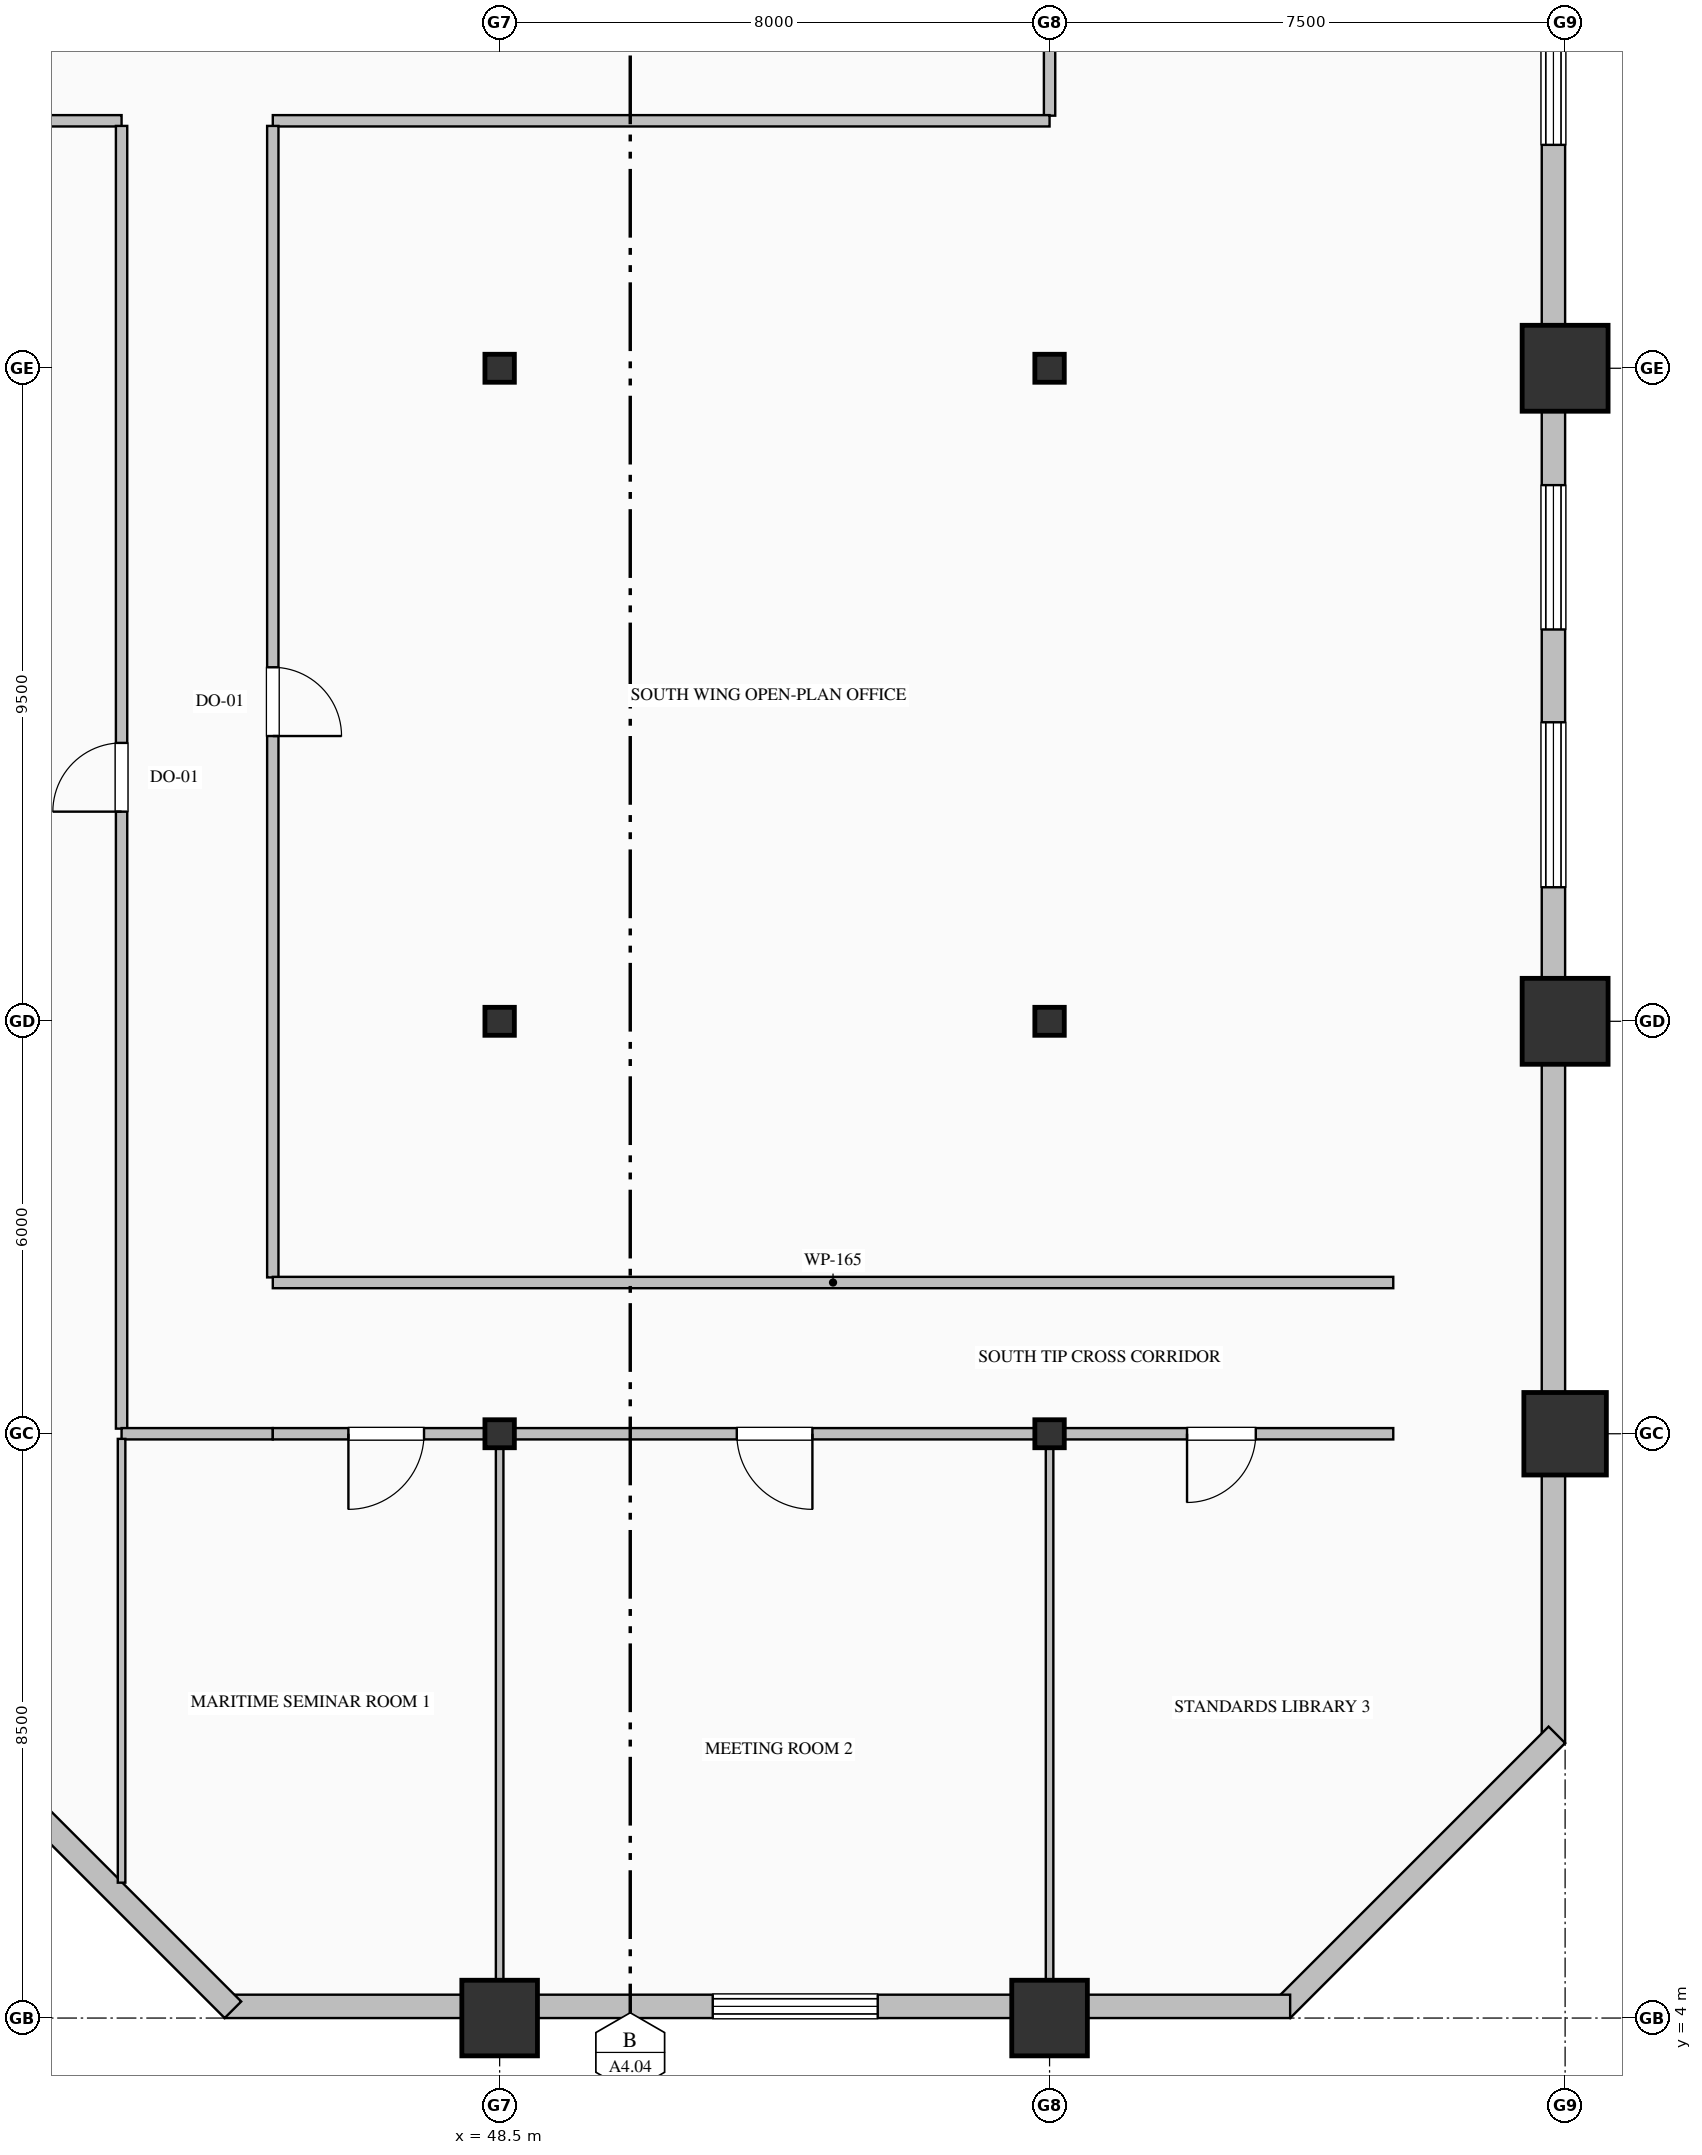
"""IFC4 building model, lengths in metres.
Left out: names, types, materials, properties, quantities, classifications, styles, units other than length and angle.
Written with IfcOpenShell. Run it as: python <this file> out.ifc"""

import sys

from ifc_helpers import new_model, si_unit, direction, frame, frame_2d, origin, origin_2d, place, context, subcontext, project, spatial, rectangle, hollow_rectangle, hollow_circle, i_section, extrude, element, fill, save


model = new_model("IFC4")
c1 = context("Model", 3, precision=1e-05, world=origin(), true_north=direction((0.0, 1.0)))
c2 = subcontext(c1, "Body", "Model", "MODEL_VIEW")
j1 = project(units=[si_unit("LENGTHUNIT", "METRE"), si_unit("PLANEANGLEUNIT", "RADIAN")], contexts=[c1])
p1 = place(None, origin())
s1 = spatial("IfcSite", under=j1, at=p1, CompositionType="ELEMENT")
p2 = place(p1, origin())
s2 = spatial("IfcBuilding", under=s1, at=p2, CompositionType="ELEMENT")
p3 = place(p2, frame((0.0, 0.0, 48.2)))
s3 = spatial("IfcBuildingStorey", under=s2, at=p3, CompositionType="ELEMENT", Elevation=48.2)
p4 = place(p3, frame((48.5, 4.0, 0.0), z_axis=(0.0, 0.0, 1.0), x_axis=(1.0, 0.0, 0.0)))
e1 = element("IfcColumn", 1, at=p4, inside=s3, PredefinedType="COLUMN", context=c2, shape_type="SweptSolid", body=[
    extrude(hollow_rectangle(XDim=1.1, YDim=1.1, WallThickness=0.04, at=origin_2d()), origin(), (0.0, 0.0, 1.0), 4.0),
])
for number, where, z_axis, x_axis in (
    (2, (48.5, 12.5, 0.0), (0.0, 0.0, 1.0), (1.0, 0.0, 0.0)),
    (3, (48.5, 18.5, 0.0), (0.0, 0.0, 1.0), (1.0, 0.0, 0.0)),
    (4, (48.5, 28.0, 0.0), (0.0, 0.0, 1.0), (1.0, 0.0, 0.0)),
):
    element("IfcColumn", number, at=place(p3, frame(where, z_axis=z_axis, x_axis=x_axis)), inside=s3, PredefinedType="COLUMN", context=c2, shape_type="SweptSolid", body=[
        extrude(i_section(OverallWidth=0.407, OverallDepth=0.428, WebThickness=0.02, FlangeThickness=0.035, FilletRadius=0.022, at=origin_2d()), origin(), (0.0, 0.0, 1.0), 4.0),
    ])
p5 = place(p3, frame((56.5, 4.0, 0.0), z_axis=(0.0, 0.0, 1.0), x_axis=(1.0, 0.0, 0.0)))
e5 = element("IfcColumn", 5, at=p5, inside=s3, PredefinedType="COLUMN", context=c2, shape_type="SweptSolid", body=[
    extrude(hollow_rectangle(XDim=1.1, YDim=1.1, WallThickness=0.04, at=origin_2d()), origin(), (0.0, 0.0, 1.0), 4.0),
])
for number, where, z_axis, x_axis in (
    (6, (56.5, 12.5, 0.0), (0.0, 0.0, 1.0), (1.0, 0.0, 0.0)),
    (7, (56.5, 18.5, 0.0), (0.0, 0.0, 1.0), (1.0, 0.0, 0.0)),
    (8, (56.5, 28.0, 0.0), (0.0, 0.0, 1.0), (1.0, 0.0, 0.0)),
):
    element("IfcColumn", number, at=place(p3, frame(where, z_axis=z_axis, x_axis=x_axis)), inside=s3, PredefinedType="COLUMN", context=c2, shape_type="SweptSolid", body=[
        extrude(i_section(OverallWidth=0.407, OverallDepth=0.428, WebThickness=0.02, FlangeThickness=0.035, FilletRadius=0.022, at=origin_2d()), origin(), (0.0, 0.0, 1.0), 4.0),
    ])
p6 = place(p3, frame((64.0, 12.5, 0.0), z_axis=(0.0, 0.0, 1.0), x_axis=(1.0, 0.0, 0.0)))
e9 = element("IfcColumn", 9, at=p6, inside=s3, PredefinedType="COLUMN", context=c2, shape_type="SweptSolid", body=[
    extrude(hollow_circle(Radius=0.6, WallThickness=0.04, at=origin_2d()), origin(), (0.0, 0.0, 1.0), 4.0),
])
for number, where, z_axis, x_axis in (
    (10, (64.0, 18.5, 0.0), (0.0, 0.0, 1.0), (1.0, 0.0, 0.0)),
    (11, (64.0, 28.0, 0.0), (0.0, 0.0, 1.0), (1.0, 0.0, 0.0)),
):
    element("IfcColumn", number, at=place(p3, frame(where, z_axis=z_axis, x_axis=x_axis)), inside=s3, PredefinedType="COLUMN", context=c2, shape_type="SweptSolid", body=[
        extrude(hollow_rectangle(XDim=1.25, YDim=1.25, WallThickness=0.045, at=origin_2d()), origin(), (0.0, 0.0, 1.0), 4.0),
    ])
p7 = place(p3, frame((63.83, 36.05, 0.0), z_axis=(0.0, 0.0, 1.0), x_axis=(0.0, -1.0, 0.0)))
e12 = element("IfcWall", 12, at=p7, inside=s3, PredefinedType="SOLIDWALL", context=c2, shape_type="SweptSolid", body=[
    extrude(rectangle(XDim=28.05, YDim=0.34, at=frame_2d((14.025, 0.0))), origin(), (0.0, 0.0, 1.0), 3.25),
])
p8 = place(p7, frame((2.4, 0.0, 0.8)))
e13 = element("IfcOpeningElement", 13, at=p8, cuts=e12, PredefinedType="OPENING", context=c2, shape_type="SweptSolid", body=[
    extrude(rectangle(XDim=2.4, YDim=2.15, at=frame_2d((1.2, 1.075))), frame((0.0, 0.18, 0.0), z_axis=(0.0, -1.0, 0.0), x_axis=(1.0, 0.0, 0.0)), (0.0, 0.0, 1.0), 0.36),
])
p9 = place(p7, frame((9.75, 0.0, 0.85)))
e14 = element("IfcOpeningElement", 14, at=p9, cuts=e12, PredefinedType="OPENING", context=c2, shape_type="SweptSolid", body=[
    extrude(rectangle(XDim=2.1, YDim=2.05, at=frame_2d((1.05, 1.025))), frame((0.0, 0.18, 0.0), z_axis=(0.0, -1.0, 0.0), x_axis=(1.0, 0.0, 0.0)), (0.0, 0.0, 1.0), 0.36),
])
p10 = place(p7, frame((13.2, 0.0, 0.8)))
e15 = element("IfcOpeningElement", 15, at=p10, cuts=e12, PredefinedType="OPENING", context=c2, shape_type="SweptSolid", body=[
    extrude(rectangle(XDim=2.4, YDim=2.15, at=frame_2d((1.2, 1.075))), frame((0.0, 0.18, 0.0), z_axis=(0.0, -1.0, 0.0), x_axis=(1.0, 0.0, 0.0)), (0.0, 0.0, 1.0), 0.36),
])
p11 = place(p3, frame((63.88, 8.12, 0.0), z_axis=(0.0, 0.0, 1.0), x_axis=(-0.707106781187, -0.707106781187, 0.0)))
e16 = element("IfcWall", 16, at=p11, inside=s3, PredefinedType="SOLIDWALL", context=c2, shape_type="SweptSolid", body=[
    extrude(rectangle(XDim=5.657, YDim=0.34, at=frame_2d((2.828, 0.0))), origin(), (0.0, 0.0, 1.0), 3.75),
])
p12 = place(p3, frame((60.0, 4.17, 0.0), z_axis=(0.0, 0.0, 1.0), x_axis=(-1.0, 0.0, 0.0)))
e17 = element("IfcWall", 17, at=p12, inside=s3, PredefinedType="SOLIDWALL", context=c2, shape_type="SweptSolid", body=[
    extrude(rectangle(XDim=15.5, YDim=0.34, at=frame_2d((7.75, 0.0))), origin(), (0.0, 0.0, 1.0), 3.25),
])
p13 = place(p12, frame((6.0, 0.0, 0.8)))
e18 = element("IfcOpeningElement", 18, at=p13, cuts=e17, PredefinedType="OPENING", context=c2, shape_type="SweptSolid", body=[
    extrude(rectangle(XDim=2.4, YDim=2.15, at=frame_2d((1.2, 1.075))), frame((0.0, 0.18, 0.0), z_axis=(0.0, -1.0, 0.0), x_axis=(1.0, 0.0, 0.0)), (0.0, 0.0, 1.0), 0.36),
])
p14 = place(p3, frame((44.62, 4.12, 0.0), z_axis=(0.0, 0.0, 1.0), x_axis=(-0.707106781187, 0.707106781187, 0.0)))
e19 = element("IfcWall", 19, at=p14, inside=s3, PredefinedType="SOLIDWALL", context=c2, shape_type="SweptSolid", body=[
    extrude(rectangle(XDim=5.657, YDim=0.34, at=frame_2d((2.828, 0.0))), origin(), (0.0, 0.0, 1.0), 3.75),
])
p15 = place(p3, frame((56.5, 33.726, 0.0), z_axis=(0.0, 0.0, 1.0), x_axis=(0.0, -1.0, 0.0)))
e20 = element("IfcWall", 20, at=p15, inside=s3, PredefinedType="PARTITIONING", context=c2, shape_type="SweptSolid", body=[
    extrude(rectangle(XDim=2.051, YDim=0.165, at=frame_2d((1.025, 0.0))), origin(), (0.0, 0.0, 1.0), 3.042),
])
p16 = place(p3, frame((56.5, 31.6, 0.0), z_axis=(0.0, 0.0, 1.0), x_axis=(-1.0, 0.0, 0.0)))
e21 = element("IfcWall", 21, at=p16, inside=s3, PredefinedType="PARTITIONING", context=c2, shape_type="SweptSolid", body=[
    extrude(rectangle(XDim=11.3, YDim=0.165, at=frame_2d((5.65, 0.0))), origin(), (0.0, 0.0, 1.0), 3.75),
])
p17 = place(p3, frame((43.0, 31.6, 0.0), z_axis=(0.0, 0.0, 1.0), x_axis=(-1.0, 0.0, 0.0)))
e22 = element("IfcWall", 22, at=p17, inside=s3, PredefinedType="PARTITIONING", context=c2, shape_type="SweptSolid", body=[
    extrude(rectangle(XDim=2.5, YDim=0.165, at=frame_2d((1.25, 0.0))), origin(), (0.0, 0.0, 1.0), 3.75),
])
p18 = place(p3, frame((45.2, 31.525, 0.0), z_axis=(0.0, 0.0, 1.0), x_axis=(0.0, -1.0, 0.0)))
e23 = element("IfcWall", 23, at=p18, inside=s3, PredefinedType="PARTITIONING", context=c2, shape_type="SweptSolid", body=[
    extrude(rectangle(XDim=16.751, YDim=0.165, at=frame_2d((8.375, 0.0))), origin(), (0.0, 0.0, 1.0), 3.75),
])
p19 = place(p18, frame((7.875, 0.0, 0.0)))
e24 = element("IfcOpeningElement", 24, at=p19, cuts=e23, PredefinedType="OPENING", context=c2, shape_type="SweptSolid", body=[
    extrude(rectangle(XDim=1.0, YDim=2.15, at=frame_2d((0.5, 1.075))), frame((0.0, 0.093, 0.0), z_axis=(0.0, -1.0, 0.0), x_axis=(1.0, 0.0, 0.0)), (0.0, 0.0, 1.0), 0.185),
])
p20 = place(p3, frame((43.0, 12.574, 0.0), z_axis=(0.0, 0.0, 1.0), x_axis=(0.0, 1.0, 0.0)))
e25 = element("IfcWall", 25, at=p20, inside=s3, PredefinedType="PARTITIONING", context=c2, shape_type="SweptSolid", body=[
    extrude(rectangle(XDim=18.951, YDim=0.165, at=frame_2d((9.476, 0.0))), origin(), (0.0, 0.0, 1.0), 3.75),
])
p21 = place(p20, frame((8.976, 0.0, 0.0)))
e26 = element("IfcOpeningElement", 26, at=p21, cuts=e25, PredefinedType="OPENING", context=c2, shape_type="SweptSolid", body=[
    extrude(rectangle(XDim=1.0, YDim=2.15, at=frame_2d((0.5, 1.075))), frame((0.0, 0.093, 0.0), z_axis=(0.0, -1.0, 0.0), x_axis=(1.0, 0.0, 0.0)), (0.0, 0.0, 1.0), 0.185),
])
p22 = place(p3, frame((45.2, 12.5, 0.0), z_axis=(0.0, 0.0, 1.0), x_axis=(-1.0, 0.0, 0.0)))
e27 = element("IfcWall", 27, at=p22, inside=s3, PredefinedType="PARTITIONING", context=c2, shape_type="SweptSolid", body=[
    extrude(rectangle(XDim=2.2, YDim=0.165, at=frame_2d((1.1, 0.0))), origin(), (0.0, 0.0, 1.0), 3.042),
])
p23 = place(p3, frame((45.2, 14.7, 0.0), z_axis=(0.0, 0.0, 1.0), x_axis=(1.0, 0.0, 0.0)))
e28 = element("IfcWall", 28, at=p23, inside=s3, PredefinedType="PARTITIONING", context=c2, shape_type="SweptSolid", body=[
    extrude(rectangle(XDim=16.3, YDim=0.165, at=frame_2d((8.15, 0.0))), origin(), (0.0, 0.0, 1.0), 3.75),
])
p24 = place(p3, frame((48.5, 12.5, 0.0), z_axis=(0.0, 0.0, 1.0), x_axis=(-1.0, 0.0, 0.0)))
e29 = element("IfcWall", 29, at=p24, inside=s3, PredefinedType="PARTITIONING", context=c2, shape_type="SweptSolid", body=[
    extrude(rectangle(XDim=3.3, YDim=0.165, at=frame_2d((1.65, 0.0))), origin(), (0.0, 0.0, 1.0), 3.042),
])
p25 = place(p24, frame((1.1, 0.0, 0.0)))
e30 = element("IfcOpeningElement", 30, at=p25, cuts=e29, PredefinedType="OPENING", context=c2, shape_type="SweptSolid", body=[
    extrude(rectangle(XDim=1.1, YDim=2.2, at=frame_2d((0.55, 1.1))), frame((0.0, 0.093, 0.0), z_axis=(0.0, -1.0, 0.0), x_axis=(1.0, 0.0, 0.0)), (0.0, 0.0, 1.0), 0.185),
])
p26 = place(p3, frame((56.5, 12.5, 0.0), z_axis=(0.0, 0.0, 1.0), x_axis=(-1.0, 0.0, 0.0)))
e31 = element("IfcWall", 31, at=p26, inside=s3, PredefinedType="PARTITIONING", context=c2, shape_type="SweptSolid", body=[
    extrude(rectangle(XDim=8.0, YDim=0.165, at=frame_2d((4.0, 0.0))), origin(), (0.0, 0.0, 1.0), 3.042),
])
p27 = place(p26, frame((3.45, 0.0, 0.0)))
e32 = element("IfcOpeningElement", 32, at=p27, cuts=e31, PredefinedType="OPENING", context=c2, shape_type="SweptSolid", body=[
    extrude(rectangle(XDim=1.1, YDim=2.2, at=frame_2d((0.55, 1.1))), frame((0.0, 0.093, 0.0), z_axis=(0.0, -1.0, 0.0), x_axis=(1.0, 0.0, 0.0)), (0.0, 0.0, 1.0), 0.185),
])
p28 = place(p3, frame((61.5, 12.5, 0.0), z_axis=(0.0, 0.0, 1.0), x_axis=(-1.0, 0.0, 0.0)))
e33 = element("IfcWall", 33, at=p28, inside=s3, PredefinedType="PARTITIONING", context=c2, shape_type="SweptSolid", body=[
    extrude(rectangle(XDim=5.0, YDim=0.165, at=frame_2d((2.5, 0.0))), origin(), (0.0, 0.0, 1.0), 3.042),
])
p29 = place(p28, frame((2.0, 0.0, 0.0)))
e34 = element("IfcOpeningElement", 34, at=p29, cuts=e33, PredefinedType="OPENING", context=c2, shape_type="SweptSolid", body=[
    extrude(rectangle(XDim=1.0, YDim=2.15, at=frame_2d((0.5, 1.075))), frame((0.0, 0.093, 0.0), z_axis=(0.0, -1.0, 0.0), x_axis=(1.0, 0.0, 0.0)), (0.0, 0.0, 1.0), 0.185),
])
p30 = place(p3, frame((43.0, 12.426, 0.0), z_axis=(0.0, 0.0, 1.0), x_axis=(0.0, -1.0, 0.0)))
e35 = element("IfcWall", 35, at=p30, inside=s3, PredefinedType="MOVABLE", context=c2, shape_type="SweptSolid", body=[
    extrude(rectangle(XDim=6.456, YDim=0.11, at=frame_2d((3.228, 0.0))), origin(), (0.0, 0.0, 1.0), 3.75),
])
for number, where, z_axis, x_axis in (
    (36, (48.5, 12.426, 0.0), (0.0, 0.0, 1.0), (0.0, -1.0, 0.0)),
    (37, (56.5, 12.426, 0.0), (0.0, 0.0, 1.0), (0.0, -1.0, 0.0)),
):
    element("IfcWall", number, at=place(p3, frame(where, z_axis=z_axis, x_axis=x_axis)), inside=s3, PredefinedType="MOVABLE", context=c2, shape_type="SweptSolid", body=[
        extrude(rectangle(XDim=8.094, YDim=0.11, at=frame_2d((4.047, 0.0))), origin(), (0.0, 0.0, 1.0), 3.042),
    ])
p31 = place(p8, origin())
e38 = element("IfcWindow", 38, at=p31, inside=s3, PartitioningType="TRIPLE_PANEL_VERTICAL", PredefinedType="WINDOW", context=c2, shape_type="SweptSolid", body=[
    extrude(rectangle(XDim=2.4, YDim=2.15, at=frame_2d((1.2, 1.075))), frame((0.0, 0.15, 0.0), z_axis=(0.0, -1.0, 0.0), x_axis=(1.0, 0.0, 0.0)), (0.0, 0.0, 1.0), 0.06),
])
fill(e13, e38)
p32 = place(p9, origin())
e39 = element("IfcWindow", 39, at=p32, inside=s3, PartitioningType="TRIPLE_PANEL_VERTICAL", PredefinedType="WINDOW", context=c2, shape_type="SweptSolid", body=[
    extrude(rectangle(XDim=2.1, YDim=2.05, at=frame_2d((1.05, 1.025))), frame((0.0, 0.15, 0.0), z_axis=(0.0, -1.0, 0.0), x_axis=(1.0, 0.0, 0.0)), (0.0, 0.0, 1.0), 0.06),
])
fill(e14, e39)
p33 = place(p10, origin())
e40 = element("IfcWindow", 40, at=p33, inside=s3, PartitioningType="TRIPLE_PANEL_VERTICAL", PredefinedType="WINDOW", context=c2, shape_type="SweptSolid", body=[
    extrude(rectangle(XDim=2.4, YDim=2.15, at=frame_2d((1.2, 1.075))), frame((0.0, 0.15, 0.0), z_axis=(0.0, -1.0, 0.0), x_axis=(1.0, 0.0, 0.0)), (0.0, 0.0, 1.0), 0.06),
])
fill(e15, e40)
p34 = place(p13, origin())
e41 = element("IfcWindow", 41, at=p34, inside=s3, PartitioningType="TRIPLE_PANEL_VERTICAL", PredefinedType="WINDOW", context=c2, shape_type="SweptSolid", body=[
    extrude(rectangle(XDim=2.4, YDim=2.15, at=frame_2d((1.2, 1.075))), frame((0.0, 0.15, 0.0), z_axis=(0.0, -1.0, 0.0), x_axis=(1.0, 0.0, 0.0)), (0.0, 0.0, 1.0), 0.06),
])
fill(e18, e41)
p35 = place(p19, origin())
e42 = element("IfcDoor", 42, at=p35, inside=s3, OperationType="SINGLE_SWING_RIGHT", PredefinedType="DOOR", context=c2, shape_type="SweptSolid", body=[
    extrude(rectangle(XDim=1.0, YDim=2.15, at=frame_2d((0.5, 1.075))), frame((0.0, 0.025, 0.0), z_axis=(0.0, -1.0, 0.0), x_axis=(1.0, 0.0, 0.0)), (0.0, 0.0, 1.0), 0.05),
])
fill(e24, e42)
p36 = place(p21, origin())
e43 = element("IfcDoor", 43, at=p36, inside=s3, OperationType="SINGLE_SWING_LEFT", PredefinedType="DOOR", context=c2, shape_type="SweptSolid", body=[
    extrude(rectangle(XDim=1.0, YDim=2.15, at=frame_2d((0.5, 1.075))), frame((0.0, 0.025, 0.0), z_axis=(0.0, -1.0, 0.0), x_axis=(1.0, 0.0, 0.0)), (0.0, 0.0, 1.0), 0.05),
])
fill(e26, e43)
p37 = place(p25, origin())
e44 = element("IfcDoor", 44, at=p37, inside=s3, OperationType="SINGLE_SWING_RIGHT", PredefinedType="DOOR", context=c2, shape_type="SweptSolid", body=[
    extrude(rectangle(XDim=1.1, YDim=2.2, at=frame_2d((0.55, 1.1))), frame((0.0, 0.025, 0.0), z_axis=(0.0, -1.0, 0.0), x_axis=(1.0, 0.0, 0.0)), (0.0, 0.0, 1.0), 0.05),
])
fill(e30, e44)
p38 = place(p27, origin())
e45 = element("IfcDoor", 45, at=p38, inside=s3, OperationType="SINGLE_SWING_LEFT", PredefinedType="DOOR", context=c2, shape_type="SweptSolid", body=[
    extrude(rectangle(XDim=1.1, YDim=2.2, at=frame_2d((0.55, 1.1))), frame((0.0, 0.025, 0.0), z_axis=(0.0, -1.0, 0.0), x_axis=(1.0, 0.0, 0.0)), (0.0, 0.0, 1.0), 0.05),
])
fill(e32, e45)
p39 = place(p29, origin())
e46 = element("IfcDoor", 46, at=p39, inside=s3, OperationType="SINGLE_SWING_RIGHT", PredefinedType="DOOR", context=c2, shape_type="SweptSolid", body=[
    extrude(rectangle(XDim=1.0, YDim=2.15, at=frame_2d((0.5, 1.075))), frame((0.0, 0.025, 0.0), z_axis=(0.0, -1.0, 0.0), x_axis=(1.0, 0.0, 0.0)), (0.0, 0.0, 1.0), 0.05),
])
fill(e34, e46)
save(model, sys.argv[1])
